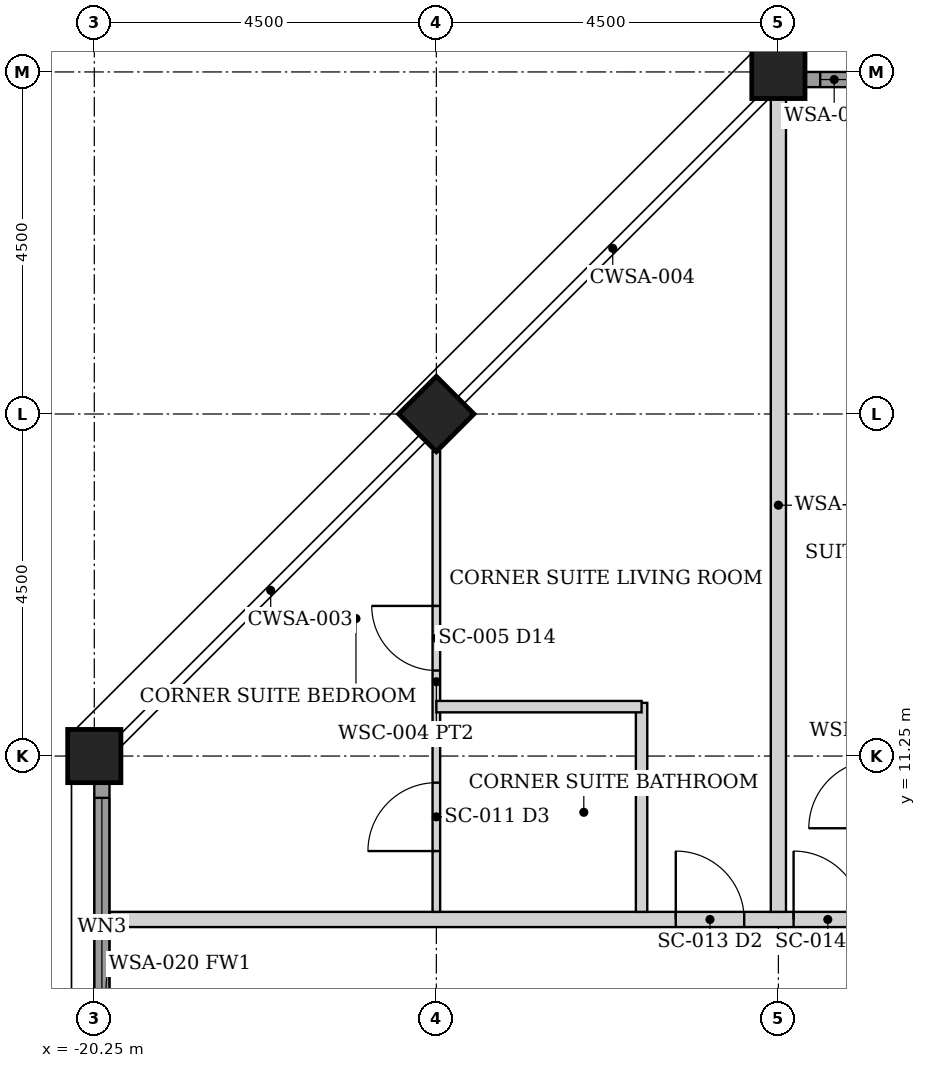
"""IFC4 building model, lengths in metres.
Left out: names, types, materials, properties, quantities, classifications, styles, units other than length and angle.
Written with IfcOpenShell. Run it as: python <this file> out.ifc"""

import sys

from ifc_helpers import new_model, si_unit, direction, frame, frame_2d, origin, origin_2d, place, context, subcontext, project, spatial, rectangle, hollow_rectangle, extrude, element, fill, save


model = new_model("IFC4")
c1 = context("Model", 3, precision=1e-05, world=origin(), true_north=direction((0.0, 1.0)))
c2 = subcontext(c1, "Body", "Model", "MODEL_VIEW")
j1 = project(units=[si_unit("LENGTHUNIT", "METRE"), si_unit("PLANEANGLEUNIT", "RADIAN")], contexts=[c1])
p1 = place(None, origin())
s1 = spatial("IfcSite", under=j1, at=p1, CompositionType="ELEMENT")
p2 = place(p1, origin())
s2 = spatial("IfcBuilding", under=s1, at=p2, CompositionType="ELEMENT")
p3 = place(p2, frame((0.0, 0.0, 223.3)))
s3 = spatial("IfcBuildingStorey", under=s2, at=p3, CompositionType="ELEMENT", Elevation=223.3)
for number, where, z_axis, x_axis in (
    (1, (-11.25, 20.25, 0.0), (0.0, 0.0, 1.0), (0.0, 1.0, 0.0)),
    (2, (-20.25, 11.25, 0.0), (0.0, 0.0, 1.0), (1.0, 0.0, 0.0)),
    (3, (-15.75, 15.75, 0.0), (0.0, 0.0, 1.0), (0.707, -0.707, 0.0)),
):
    element("IfcColumn", number, at=place(p3, frame(where, z_axis=z_axis, x_axis=x_axis)), inside=s3, PredefinedType="COLUMN", context=c2, shape_type="SweptSolid", body=[
        extrude(hollow_rectangle(XDim=0.7, YDim=0.7, WallThickness=0.04, at=origin_2d()), origin(), (0.0, 0.0, 1.0), 3.75),
    ])
p4 = place(p3, frame((-10.895, 20.15, 0.0), z_axis=(0.0, 0.0, 1.0), x_axis=(1.0, 0.0, 0.0)))
e4 = element("IfcWall", 4, at=p4, inside=s3, PredefinedType="SOLIDWALL", context=c2, shape_type="SweptSolid", body=[
    extrude(rectangle(XDim=3.79, YDim=0.2, at=frame_2d((1.895, 0.0))), origin(), (0.0, 0.0, 1.0), 2.629),
])
p5 = place(p4, frame((0.195, 0.0, 0.3)))
e5 = element("IfcOpeningElement", 5, at=p5, cuts=e4, PredefinedType="OPENING", context=c2, shape_type="SweptSolid", body=[
    extrude(rectangle(XDim=3.4, YDim=2.179, at=frame_2d((1.7, 1.089))), frame((0.0, 0.11, 0.0), z_axis=(0.0, -1.0, 0.0), x_axis=(1.0, 0.0, 0.0)), (0.0, 0.0, 1.0), 0.22),
])
p6 = place(p3, frame((-20.15, 7.105, 0.0), z_axis=(0.0, 0.0, 1.0), x_axis=(0.0, 1.0, 0.0)))
e6 = element("IfcWall", 6, at=p6, inside=s3, PredefinedType="SOLIDWALL", context=c2, shape_type="SweptSolid", body=[
    extrude(rectangle(XDim=3.79, YDim=0.2, at=frame_2d((1.895, 0.0))), origin(), (0.0, 0.0, 1.0), 2.629),
])
p7 = place(p6, frame((0.195, 0.0, 0.3)))
e7 = element("IfcOpeningElement", 7, at=p7, cuts=e6, PredefinedType="OPENING", context=c2, shape_type="SweptSolid", body=[
    extrude(rectangle(XDim=3.4, YDim=2.179, at=frame_2d((1.7, 1.089))), frame((0.0, 0.11, 0.0), z_axis=(0.0, -1.0, 0.0), x_axis=(1.0, 0.0, 0.0)), (0.0, 0.0, 1.0), 0.22),
])
p8 = place(p3, frame((-20.05, 9.1, 0.0), z_axis=(0.0, 0.0, 1.0), x_axis=(1.0, 0.0, 0.0)))
e8 = element("IfcWall", 8, at=p8, inside=s3, PredefinedType="PARTITIONING", context=c2, shape_type="SweptSolid", body=[
    extrude(rectangle(XDim=40.1, YDim=0.2, at=frame_2d((20.05, 0.0))), origin(), (0.0, 0.0, 1.0), 2.629),
])
p9 = place(p8, frame((9.0, 0.0, 0.0)))
e9 = element("IfcOpeningElement", 9, at=p9, cuts=e8, PredefinedType="OPENING", context=c2, shape_type="SweptSolid", body=[
    extrude(rectangle(XDim=0.9, YDim=2.1, at=frame_2d((0.45, 1.05))), frame((0.0, 0.11, 0.0), z_axis=(0.0, -1.0, 0.0), x_axis=(1.0, 0.0, 0.0)), (0.0, 0.0, 1.0), 0.22),
])
p10 = place(p8, frame((16.7, 0.0, 0.0)))
e10 = element("IfcOpeningElement", 10, at=p10, cuts=e8, PredefinedType="OPENING", context=c2, shape_type="SweptSolid", body=[
    extrude(rectangle(XDim=0.9, YDim=2.1, at=frame_2d((0.45, 1.05))), frame((0.0, 0.11, 0.0), z_axis=(0.0, -1.0, 0.0), x_axis=(1.0, 0.0, 0.0)), (0.0, 0.0, 1.0), 0.22),
])
p11 = place(p8, frame((18.0, 0.0, 0.0)))
e11 = element("IfcOpeningElement", 11, at=p11, cuts=e8, PredefinedType="OPENING", context=c2, shape_type="SweptSolid", body=[
    extrude(rectangle(XDim=0.9, YDim=2.1, at=frame_2d((0.45, 1.05))), frame((0.0, 0.11, 0.0), z_axis=(0.0, -1.0, 0.0), x_axis=(1.0, 0.0, 0.0)), (0.0, 0.0, 1.0), 0.22),
])
p12 = place(p8, frame((22.6, 0.0, 0.0)))
e12 = element("IfcOpeningElement", 12, at=p12, cuts=e8, PredefinedType="OPENING", context=c2, shape_type="SweptSolid", body=[
    extrude(rectangle(XDim=0.9, YDim=2.1, at=frame_2d((0.45, 1.05))), frame((0.0, 0.11, 0.0), z_axis=(0.0, -1.0, 0.0), x_axis=(1.0, 0.0, 0.0)), (0.0, 0.0, 1.0), 0.22),
])
p13 = place(p8, frame((31.75, 0.0, 0.0)))
e13 = element("IfcOpeningElement", 13, at=p13, cuts=e8, PredefinedType="OPENING", context=c2, shape_type="SweptSolid", body=[
    extrude(rectangle(XDim=0.9, YDim=2.1, at=frame_2d((0.45, 1.05))), frame((0.0, 0.11, 0.0), z_axis=(0.0, -1.0, 0.0), x_axis=(1.0, 0.0, 0.0)), (0.0, 0.0, 1.0), 0.22),
])
p14 = place(p8, frame((7.45, 0.0, 0.0)))
e14 = element("IfcOpeningElement", 14, at=p14, cuts=e8, PredefinedType="OPENING", context=c2, shape_type="SweptSolid", body=[
    extrude(rectangle(XDim=0.9, YDim=2.1, at=frame_2d((0.45, 1.05))), frame((0.0, 0.11, 0.0), z_axis=(0.0, -1.0, 0.0), x_axis=(1.0, 0.0, 0.0)), (0.0, 0.0, 1.0), 0.22),
])
p15 = place(p3, frame((-11.25, 9.2, 0.0), z_axis=(0.0, 0.0, 1.0), x_axis=(0.0, 1.0, 0.0)))
e15 = element("IfcWall", 15, at=p15, inside=s3, PredefinedType="PARTITIONING", context=c2, shape_type="SweptSolid", body=[
    extrude(rectangle(XDim=10.7, YDim=0.2, at=frame_2d((5.35, 0.0))), origin(), (0.0, 0.0, 1.0), 2.629),
])
p16 = place(p3, frame((-15.75, 9.2, 0.0), z_axis=(0.0, 0.0, 1.0), x_axis=(0.0, 1.0, 0.0)))
e16 = element("IfcWall", 16, at=p16, inside=s3, PredefinedType="PARTITIONING", context=c2, shape_type="SweptSolid", body=[
    extrude(rectangle(XDim=6.055, YDim=0.1, at=frame_2d((3.027, 0.0))), origin(), (0.0, 0.0, 1.0), 2.629),
])
p17 = place(p16, frame((3.175, 0.0, 0.0)))
e17 = element("IfcOpeningElement", 17, at=p17, cuts=e16, PredefinedType="OPENING", context=c2, shape_type="SweptSolid", body=[
    extrude(rectangle(XDim=0.85, YDim=2.1, at=frame_2d((0.425, 1.05))), frame((0.0, 0.06, 0.0), z_axis=(0.0, -1.0, 0.0), x_axis=(1.0, 0.0, 0.0)), (0.0, 0.0, 1.0), 0.12),
])
p18 = place(p16, frame((0.8, 0.0, 0.0)))
e18 = element("IfcOpeningElement", 18, at=p18, cuts=e16, PredefinedType="OPENING", context=c2, shape_type="SweptSolid", body=[
    extrude(rectangle(XDim=0.9, YDim=2.1, at=frame_2d((0.45, 1.05))), frame((0.0, 0.06, 0.0), z_axis=(0.0, -1.0, 0.0), x_axis=(1.0, 0.0, 0.0)), (0.0, 0.0, 1.0), 0.12),
])
p19 = place(p3, frame((-13.05, 9.2, 0.0), z_axis=(0.0, 0.0, 1.0), x_axis=(0.0, 1.0, 0.0)))
e19 = element("IfcWall", 19, at=p19, inside=s3, PredefinedType="PARTITIONING", context=c2, shape_type="SweptSolid", body=[
    extrude(rectangle(XDim=2.75, YDim=0.15, at=frame_2d((1.375, 0.0))), origin(), (0.0, 0.0, 1.0), 2.629),
])
p20 = place(p3, frame((-15.75, 11.9, 0.0), z_axis=(0.0, 0.0, 1.0), x_axis=(1.0, 0.0, 0.0)))
e20 = element("IfcWall", 20, at=p20, inside=s3, PredefinedType="PARTITIONING", context=c2, shape_type="SweptSolid", body=[
    extrude(rectangle(XDim=2.7, YDim=0.15, at=frame_2d((1.35, 0.0))), origin(), (0.0, 0.0, 1.0), 2.629),
])
p21 = place(p5, origin())
e21 = element("IfcWindow", 21, at=p21, inside=s3, PartitioningType="SINGLE_PANEL", PredefinedType="WINDOW", context=c2, shape_type="SweptSolid", body=[
    extrude(rectangle(XDim=3.4, YDim=2.179, at=frame_2d((1.7, 1.089))), frame((0.0, 0.03, 0.0), z_axis=(0.0, -1.0, 0.0), x_axis=(1.0, 0.0, 0.0)), (0.0, 0.0, 1.0), 0.06),
])
fill(e5, e21)
p22 = place(p7, origin())
e22 = element("IfcWindow", 22, at=p22, inside=s3, PartitioningType="SINGLE_PANEL", PredefinedType="WINDOW", context=c2, shape_type="SweptSolid", body=[
    extrude(rectangle(XDim=3.4, YDim=2.179, at=frame_2d((1.7, 1.089))), frame((0.0, 0.03, 0.0), z_axis=(0.0, -1.0, 0.0), x_axis=(1.0, 0.0, 0.0)), (0.0, 0.0, 1.0), 0.06),
])
fill(e7, e22)
p23 = place(p9, origin())
e23 = element("IfcDoor", 23, at=p23, inside=s3, OperationType="SINGLE_SWING_LEFT", PredefinedType="DOOR", context=c2, shape_type="SweptSolid", body=[
    extrude(rectangle(XDim=0.9, YDim=2.1, at=frame_2d((0.45, 1.05))), frame((0.0, 0.025, 0.0), z_axis=(0.0, -1.0, 0.0), x_axis=(1.0, 0.0, 0.0)), (0.0, 0.0, 1.0), 0.05),
])
fill(e9, e23)
p24 = place(p14, origin())
e24 = element("IfcDoor", 24, at=p24, inside=s3, OperationType="SINGLE_SWING_LEFT", PredefinedType="DOOR", context=c2, shape_type="SweptSolid", body=[
    extrude(rectangle(XDim=0.9, YDim=2.1, at=frame_2d((0.45, 1.05))), frame((0.0, 0.025, 0.0), z_axis=(0.0, -1.0, 0.0), x_axis=(1.0, 0.0, 0.0)), (0.0, 0.0, 1.0), 0.05),
])
fill(e14, e24)
p25 = place(p17, origin())
e25 = element("IfcDoor", 25, at=p25, inside=s3, OperationType="SINGLE_SWING_RIGHT", PredefinedType="DOOR", context=c2, shape_type="SweptSolid", body=[
    extrude(rectangle(XDim=0.85, YDim=2.1, at=frame_2d((0.425, 1.05))), frame((0.0, 0.025, 0.0), z_axis=(0.0, -1.0, 0.0), x_axis=(1.0, 0.0, 0.0)), (0.0, 0.0, 1.0), 0.05),
])
fill(e17, e25)
p26 = place(p18, origin())
e26 = element("IfcDoor", 26, at=p26, inside=s3, OperationType="SINGLE_SWING_LEFT", PredefinedType="DOOR", context=c2, shape_type="SweptSolid", body=[
    extrude(rectangle(XDim=0.9, YDim=2.1, at=frame_2d((0.45, 1.05))), frame((0.0, 0.025, 0.0), z_axis=(0.0, -1.0, 0.0), x_axis=(1.0, 0.0, 0.0)), (0.0, 0.0, 1.0), 0.05),
])
fill(e18, e26)
save(model, sys.argv[1])
